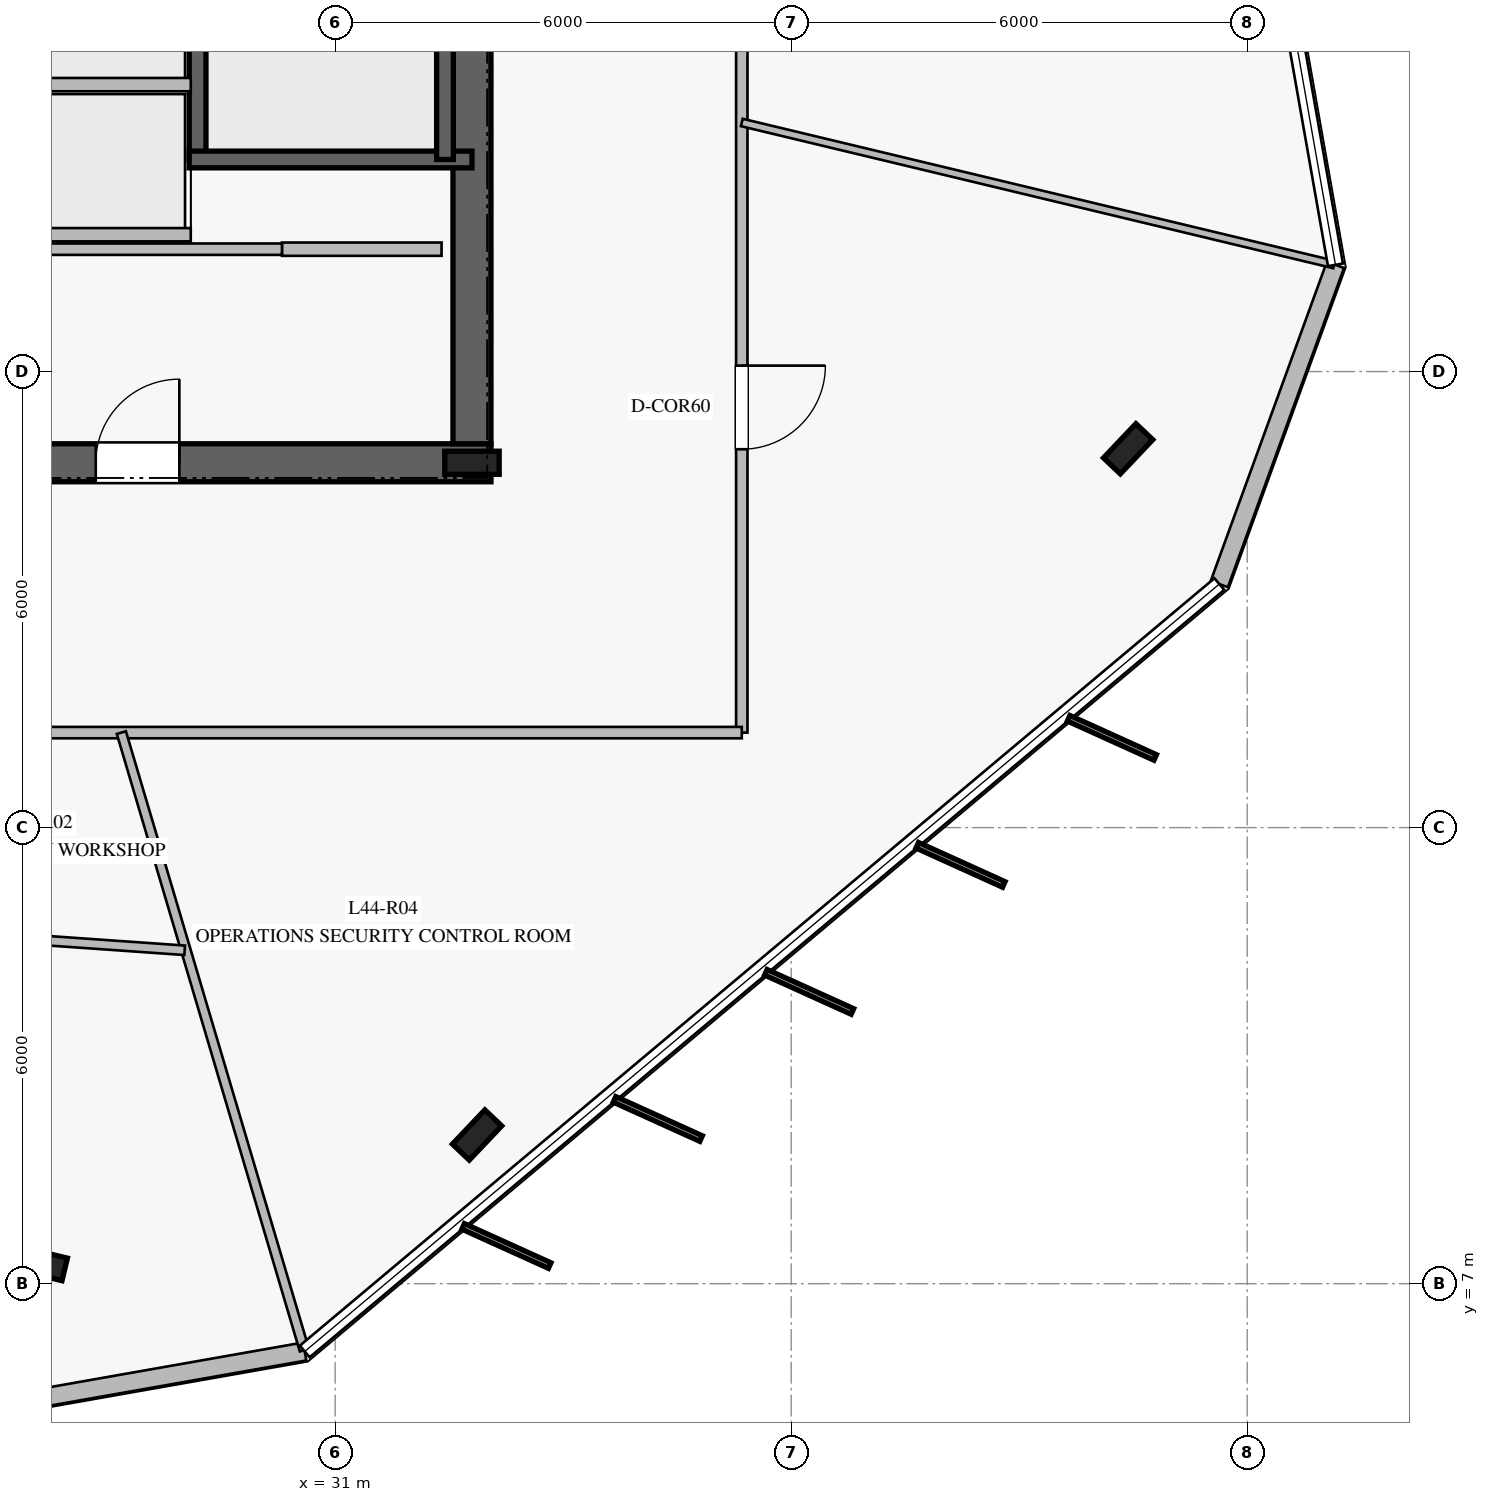
"""IFC4 building model, lengths in metres.
Left out: names, types, materials, properties, quantities, classifications, styles, units other than length and angle.
Written with IfcOpenShell. Run it as: python <this file> out.ifc"""

import sys

from ifc_helpers import new_model, si_unit, direction, frame, frame_2d, origin, origin_2d, place, context, subcontext, project, spatial, rectangle, i_section, extrude, element, fill, save


model = new_model("IFC4")
c1 = context("Model", 3, precision=1e-05, world=origin(), true_north=direction((0.0, 1.0)))
c2 = subcontext(c1, "Body", "Model", "MODEL_VIEW")
j1 = project(units=[si_unit("LENGTHUNIT", "METRE"), si_unit("PLANEANGLEUNIT", "RADIAN")], contexts=[c1])
p1 = place(None, origin())
s1 = spatial("IfcSite", under=j1, at=p1, CompositionType="ELEMENT")
p2 = place(p1, origin())
s2 = spatial("IfcBuilding", under=s1, at=p2, CompositionType="ELEMENT")
p3 = place(p2, frame((0.0, 0.0, 184.8)))
s3 = spatial("IfcBuildingStorey", under=s2, at=p3, CompositionType="ELEMENT", Elevation=184.8)
p4 = place(p3, frame((16.95, 17.8, 0.0), z_axis=(0.0, 0.0, 1.0), x_axis=(1.0, 0.0, 0.0)))
e1 = element("IfcWall", 1, at=p4, inside=s3, PredefinedType="SHEAR", context=c2, shape_type="SweptSolid", body=[
    extrude(rectangle(XDim=16.1, YDim=0.5, at=frame_2d((8.05, 0.0))), origin(), (0.0, 0.0, 1.0), 3.78),
])
p5 = place(p4, frame((5.0, 0.0, 0.0)))
e2 = element("IfcOpeningElement", 2, at=p5, cuts=e1, PredefinedType="OPENING", context=c2, shape_type="SweptSolid", body=[
    extrude(rectangle(XDim=1.2, YDim=2.25, at=frame_2d((0.6, 1.125))), frame((0.0, 0.26, 0.0), z_axis=(0.0, -1.0, 0.0), x_axis=(1.0, 0.0, 0.0)), (0.0, 0.0, 1.0), 0.52),
])
p6 = place(p4, frame((10.9, 0.0, 0.0)))
e3 = element("IfcOpeningElement", 3, at=p6, cuts=e1, PredefinedType="OPENING", context=c2, shape_type="SweptSolid", body=[
    extrude(rectangle(XDim=1.1, YDim=2.2, at=frame_2d((0.55, 1.1))), frame((0.0, 0.26, 0.0), z_axis=(0.0, -1.0, 0.0), x_axis=(1.0, 0.0, 0.0)), (0.0, 0.0, 1.0), 0.52),
])
p7 = place(p3, frame((32.8, 18.05, 0.0), z_axis=(0.0, 0.0, 1.0), x_axis=(0.0, 1.0, 0.0)))
e4 = element("IfcWall", 4, at=p7, inside=s3, PredefinedType="SHEAR", context=c2, shape_type="SweptSolid", body=[
    extrude(rectangle(XDim=13.9, YDim=0.5, at=frame_2d((6.95, 0.0))), origin(), (0.0, 0.0, 1.0), 3.78),
])
p8 = place(p3, frame((32.8, 17.8, 0.0), z_axis=(0.0, 0.0, 1.0), x_axis=(1.0, 0.0, 0.0)))
e5 = element("IfcColumn", 5, at=p8, inside=s3, PredefinedType="COLUMN", context=c2, shape_type="SweptSolid", body=[
    extrude(i_section(OverallWidth=0.304, OverallDepth=0.716, WebThickness=0.021, FlangeThickness=0.04, at=origin_2d()), origin(), (0.0, 0.0, 1.0), 4.0),
])
p9 = place(p3, frame((29.19, 21.79, 0.0), z_axis=(0.0, 0.0, 1.0), x_axis=(0.0, 1.0, 0.0)))
e6 = element("IfcWall", 6, at=p9, inside=s3, PredefinedType="SOLIDWALL", context=c2, shape_type="SweptSolid", body=[
    extrude(rectangle(XDim=7.22, YDim=0.22, at=frame_2d((3.61, 0.0))), origin(), (0.0, 0.0, 1.0), 3.78),
])
p10 = place(p9, frame((5.88, 0.0, 0.0)))
e7 = element("IfcOpeningElement", 7, at=p10, cuts=e6, PredefinedType="OPENING", context=c2, shape_type="SweptSolid", body=[
    extrude(rectangle(XDim=1.15, YDim=2.2, at=frame_2d((0.575, 1.1))), frame((0.0, 0.12, 0.0), z_axis=(0.0, -1.0, 0.0), x_axis=(1.0, 0.0, 0.0)), (0.0, 0.0, 1.0), 0.24),
])
p11 = place(p3, frame((29.08, 21.79, 0.0), z_axis=(0.0, 0.0, 1.0), x_axis=(1.0, 0.0, 0.0)))
e8 = element("IfcWall", 8, at=p11, inside=s3, PredefinedType="SOLIDWALL", context=c2, shape_type="SweptSolid", body=[
    extrude(rectangle(XDim=3.72, YDim=0.22, at=frame_2d((1.86, 0.0))), origin(), (0.0, 0.0, 1.0), 3.78),
])
p12 = place(p3, frame((32.445, 29.01, 0.0), z_axis=(0.0, 0.0, 1.0), x_axis=(0.0, -1.0, 0.0)))
e9 = element("IfcWall", 9, at=p12, inside=s3, PredefinedType="SOLIDWALL", context=c2, shape_type="SweptSolid", body=[
    extrude(rectangle(XDim=7.22, YDim=0.22, at=frame_2d((3.61, 0.0))), origin(), (0.0, 0.0, 1.0), 3.78),
])
for number, where, z_axis, x_axis in (
    (10, (27.14, 7.26, 0.0), (0.0, 0.0, 1.0), (-0.972, 0.233, 0.0)),
    (11, (32.867, 8.956, 0.0), (0.0, 0.0, 1.0), (0.688, 0.725, 0.0)),
    (12, (41.433, 17.984, 0.0), (0.0, 0.0, 1.0), (0.688, 0.725, 0.0)),
):
    element("IfcColumn", number, at=place(p3, frame(where, z_axis=z_axis, x_axis=x_axis)), inside=s3, PredefinedType="COLUMN", context=c2, shape_type="SweptSolid", body=[
        extrude(i_section(OverallWidth=0.305, OverallDepth=0.62, WebThickness=0.021, FlangeThickness=0.04, at=origin_2d()), origin(), (0.0, 0.0, 1.0), 4.0),
    ])
p13 = place(p3, frame((26.199, 5.332, 0.0), z_axis=(0.0, 0.0, 1.0), x_axis=(0.984813792018, 0.173613925281, 0.0)))
e13 = element("IfcWall", 13, at=p13, inside=s3, PredefinedType="STANDARD", context=c2, shape_type="SweptSolid", body=[
    extrude(rectangle(XDim=4.469, YDim=0.24, at=frame_2d((2.234, 0.0))), origin(), (0.0, 0.0, 1.0), 3.78),
])
p14 = place(p3, frame((42.633, 16.204, 0.0), z_axis=(0.0, 0.0, 1.0), x_axis=(0.341857099862, 0.939751947736, 0.0)))
e14 = element("IfcWall", 14, at=p14, inside=s3, PredefinedType="STANDARD", context=c2, shape_type="SweptSolid", body=[
    extrude(rectangle(XDim=4.469, YDim=0.24, at=frame_2d((2.235, 0.0))), origin(), (0.0, 0.0, 1.0), 3.78),
])
p15 = place(p3, frame((30.3, 20.61, 0.0), z_axis=(0.0, 0.0, 1.0), x_axis=(1.0, 0.0, 0.0)))
e15 = element("IfcWall", 15, at=p15, inside=s3, PredefinedType="PARTITIONING", context=c2, shape_type="SweptSolid", body=[
    extrude(rectangle(XDim=2.1, YDim=0.175, at=frame_2d((1.05, 0.0))), origin(), (0.0, 0.0, 1.0), 3.78),
])
p16 = place(p3, frame((24.4, 20.61, 0.0), z_axis=(0.0, 0.0, 1.0), x_axis=(1.0, 0.0, 0.0)))
e16 = element("IfcWall", 16, at=p16, inside=s3, PredefinedType="PARTITIONING", context=c2, shape_type="SweptSolid", body=[
    extrude(rectangle(XDim=5.9, YDim=0.15, at=frame_2d((2.95, 0.0))), origin(), (0.0, 0.0, 1.0), 3.78),
])
for number, where, z_axis, x_axis in (
    (17, (26.75, 20.8, 0.0), (0.0, 0.0, 1.0), (1.0, 0.0, 0.0)),
    (18, (26.75, 22.775, 0.0), (0.0, 0.0, 1.0), (1.0, 0.0, 0.0)),
):
    element("IfcWall", number, at=place(p3, frame(where, z_axis=z_axis, x_axis=x_axis)), inside=s3, PredefinedType="PARTITIONING", context=c2, shape_type="SweptSolid", body=[
        extrude(rectangle(XDim=2.35, YDim=0.175, at=frame_2d((1.175, 0.0))), origin(), (0.0, 0.0, 1.0), 3.78),
    ])
p17 = place(p3, frame((36.35, 35.75, 0.0), z_axis=(0.0, 0.0, 1.0), x_axis=(0.0, -1.0, 0.0)))
e19 = element("IfcWall", 19, at=p17, inside=s3, PredefinedType="PARTITIONING", context=c2, shape_type="SweptSolid", body=[
    extrude(rectangle(XDim=21.5, YDim=0.15, at=frame_2d((10.75, 0.0))), origin(), (0.0, 0.0, 1.0), 3.05),
])
p18 = place(p17, frame((16.672, 0.0, 0.0)))
e20 = element("IfcOpeningElement", 20, at=p18, cuts=e19, PredefinedType="OPENING", context=c2, shape_type="SweptSolid", body=[
    extrude(rectangle(XDim=1.1, YDim=2.2, at=frame_2d((0.55, 1.1))), frame((0.0, 0.085, 0.0), z_axis=(0.0, -1.0, 0.0), x_axis=(1.0, 0.0, 0.0)), (0.0, 0.0, 1.0), 0.17),
])
p19 = place(p17, frame((7.788, 0.0, 0.0)))
e21 = element("IfcOpeningElement", 21, at=p19, cuts=e19, PredefinedType="OPENING", context=c2, shape_type="SweptSolid", body=[
    extrude(rectangle(XDim=1.1, YDim=2.2, at=frame_2d((0.55, 1.1))), frame((0.0, 0.085, 0.0), z_axis=(0.0, -1.0, 0.0), x_axis=(1.0, 0.0, 0.0)), (0.0, 0.0, 1.0), 0.17),
])
p20 = place(p3, frame((36.35, 14.25, 0.0), z_axis=(0.0, 0.0, 1.0), x_axis=(-1.0, 0.0, 0.0)))
e22 = element("IfcWall", 22, at=p20, inside=s3, PredefinedType="PARTITIONING", context=c2, shape_type="SweptSolid", body=[
    extrude(rectangle(XDim=22.7, YDim=0.15, at=frame_2d((11.35, 0.0))), origin(), (0.0, 0.0, 1.0), 3.05),
])
p21 = place(p20, frame((14.341, 0.0, 0.0)))
e23 = element("IfcOpeningElement", 23, at=p21, cuts=e22, PredefinedType="OPENING", context=c2, shape_type="SweptSolid", body=[
    extrude(rectangle(XDim=1.1, YDim=2.2, at=frame_2d((0.55, 1.1))), frame((0.0, 0.085, 0.0), z_axis=(0.0, -1.0, 0.0), x_axis=(1.0, 0.0, 0.0)), (0.0, 0.0, 1.0), 0.17),
])
p22 = place(p3, frame((28.187, 14.25, 0.0), z_axis=(0.0, 0.0, 1.0), x_axis=(0.284179562535, -0.958771076033, 0.0)))
e24 = element("IfcWall", 24, at=p22, inside=s3, PredefinedType="PARTITIONING", context=c2, shape_type="SweptSolid", body=[
    extrude(rectangle(XDim=8.473, YDim=0.125, at=frame_2d((4.237, 0.0))), origin(), (0.0, 0.0, 1.0), 3.18),
])
p23 = place(p3, frame((36.35, 22.277, 0.0), z_axis=(0.0, 0.0, 1.0), x_axis=(0.972420475655, -0.233234685514, 0.0)))
e25 = element("IfcWall", 25, at=p23, inside=s3, PredefinedType="MOVABLE", context=c2, shape_type="SweptSolid", body=[
    extrude(rectangle(XDim=8.014, YDim=0.1, at=frame_2d((4.007, 0.0))), origin(), (0.0, 0.0, 1.0), 3.18),
])
p24 = place(p3, frame((13.159, 12.496, 0.0), z_axis=(0.0, 0.0, 1.0), x_axis=(0.99755970511, -0.069818584499, 0.0)))
e26 = element("IfcWall", 26, at=p24, inside=s3, PredefinedType="PARTITIONING", context=c2, shape_type="SweptSolid", body=[
    extrude(rectangle(XDim=15.9, YDim=0.125, at=frame_2d((7.95, 0.0))), origin(), (0.0, 0.0, 1.0), 3.28),
])
p25 = place(p24, frame((7.36, 0.0, 0.0)))
e27 = element("IfcOpeningElement", 27, at=p25, cuts=e26, PredefinedType="OPENING", context=c2, shape_type="SweptSolid", body=[
    extrude(rectangle(XDim=1.0, YDim=2.15, at=frame_2d((0.5, 1.075))), frame((0.0, 0.073, 0.0), z_axis=(0.0, -1.0, 0.0), x_axis=(1.0, 0.0, 0.0)), (0.0, 0.0, 1.0), 0.145),
])
p26 = place(p6, origin())
e28 = element("IfcDoor", 28, at=p26, inside=s3, OperationType="SINGLE_SWING_RIGHT", PredefinedType="DOOR", context=c2, shape_type="SweptSolid", body=[
    extrude(rectangle(XDim=1.1, YDim=2.2, at=frame_2d((0.55, 1.1))), frame((0.0, 0.025, 0.0), z_axis=(0.0, -1.0, 0.0), x_axis=(1.0, 0.0, 0.0)), (0.0, 0.0, 1.0), 0.05),
])
fill(e3, e28)
p27 = place(p18, origin())
e29 = element("IfcDoor", 29, at=p27, inside=s3, OperationType="SINGLE_SWING_LEFT", PredefinedType="DOOR", context=c2, shape_type="SweptSolid", body=[
    extrude(rectangle(XDim=1.1, YDim=2.2, at=frame_2d((0.55, 1.1))), frame((0.0, 0.025, 0.0), z_axis=(0.0, -1.0, 0.0), x_axis=(1.0, 0.0, 0.0)), (0.0, 0.0, 1.0), 0.05),
])
fill(e20, e29)
save(model, sys.argv[1])
